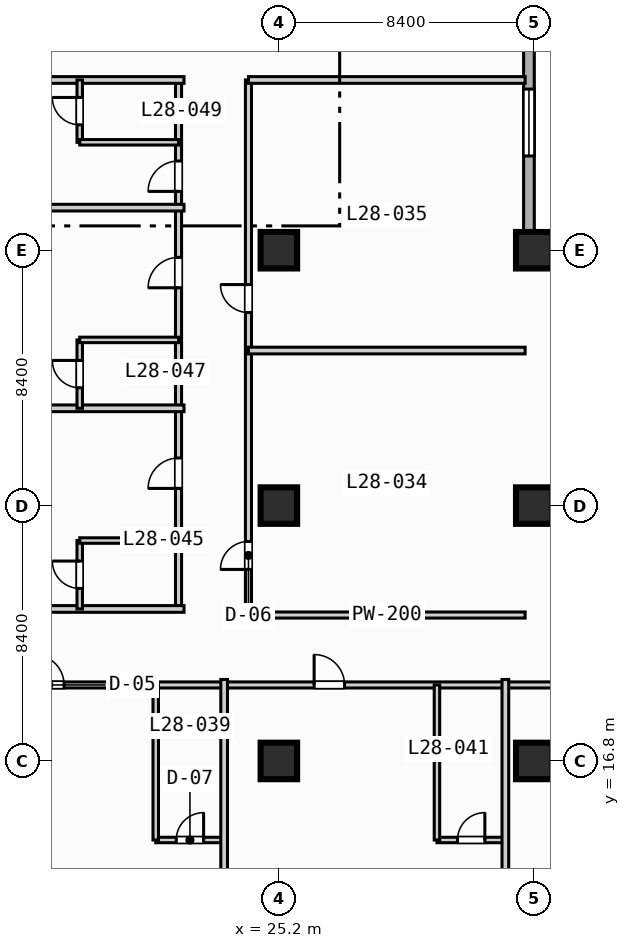
"""IFC4 building model, lengths in metres.
Left out: names, types, materials, properties, quantities, classifications, styles, units other than length and angle.
Written with IfcOpenShell. Run it as: python <this file> out.ifc"""

import sys

from ifc_helpers import new_model, si_unit, direction, frame, frame_2d, origin, origin_2d, place, context, subcontext, project, spatial, rectangle, extrude, element, fill, save


model = new_model("IFC4")
c1 = context("Model", 3, precision=1e-05, world=origin(), true_north=direction((0.0, 1.0)))
c2 = subcontext(c1, "Body", "Model", "MODEL_VIEW")
j1 = project(units=[si_unit("LENGTHUNIT", "METRE"), si_unit("PLANEANGLEUNIT", "RADIAN")], contexts=[c1])
p1 = place(None, origin())
s1 = spatial("IfcSite", under=j1, at=p1, CompositionType="ELEMENT")
p2 = place(p1, origin())
s2 = spatial("IfcBuilding", under=s1, at=p2, CompositionType="ELEMENT")
p3 = place(p2, frame((0.0, 0.0, 119.0)))
s3 = spatial("IfcBuildingStorey", under=s2, at=p3, CompositionType="ELEMENT", Elevation=119.0)
for number, where, z_axis, x_axis in (
    (1, (25.2, 16.8, 0.0), (0.0, 0.0, 1.0), (1.0, 0.0, 0.0)),
    (2, (25.2, 25.2, 0.0), (0.0, 0.0, 1.0), (1.0, 0.0, 0.0)),
    (3, (25.2, 33.6, 0.0), (0.0, 0.0, 1.0), (1.0, 0.0, 0.0)),
    (4, (33.6, 16.8, 0.0), (0.0, 0.0, 1.0), (1.0, 0.0, 0.0)),
    (5, (33.6, 25.2, 0.0), (0.0, 0.0, 1.0), (1.0, 0.0, 0.0)),
    (6, (33.6, 33.6, 0.0), (0.0, 0.0, 1.0), (1.0, 0.0, 0.0)),
):
    element("IfcColumn", number, at=place(p3, frame(where, z_axis=z_axis, x_axis=x_axis)), inside=s3, PredefinedType="COLUMN", context=c2, shape_type="SweptSolid", body=[
        extrude(rectangle(XDim=1.2, YDim=1.2, at=origin_2d()), origin(), (0.0, 0.0, 1.0), 3.8),
    ])
p4 = place(p3, frame((33.425, 89.225, 0.0), z_axis=(0.0, 0.0, 1.0), x_axis=(0.0, -1.0, 0.0)))
e7 = element("IfcWall", 7, at=p4, inside=s3, PredefinedType="STANDARD", context=c2, shape_type="SweptSolid", body=[
    extrude(rectangle(XDim=55.8, YDim=0.35, at=frame_2d((27.9, 0.0))), origin(), (0.0, 0.0, 1.0), 3.55),
])
p5 = place(p4, frame((50.325, 0.0, 0.85)))
e8 = element("IfcOpeningElement", 8, at=p5, cuts=e7, PredefinedType="OPENING", context=c2, shape_type="SweptSolid", body=[
    extrude(rectangle(XDim=2.2, YDim=1.8, at=frame_2d((1.1, 0.9))), frame((0.0, 0.185, 0.0), z_axis=(0.0, -1.0, 0.0), x_axis=(1.0, 0.0, 0.0)), (0.0, 0.0, 1.0), 0.37),
])
p6 = place(p4, frame((33.525, 0.0, 0.85)))
e9 = element("IfcOpeningElement", 9, at=p6, cuts=e7, PredefinedType="OPENING", context=c2, shape_type="SweptSolid", body=[
    extrude(rectangle(XDim=2.2, YDim=1.8, at=frame_2d((1.1, 0.9))), frame((0.0, 0.185, 0.0), z_axis=(0.0, -1.0, 0.0), x_axis=(1.0, 0.0, 0.0)), (0.0, 0.0, 1.0), 0.37),
])
p7 = place(p4, frame((25.125, 0.0, 0.85)))
e10 = element("IfcOpeningElement", 10, at=p7, cuts=e7, PredefinedType="OPENING", context=c2, shape_type="SweptSolid", body=[
    extrude(rectangle(XDim=2.2, YDim=1.8, at=frame_2d((1.1, 0.9))), frame((0.0, 0.185, 0.0), z_axis=(0.0, -1.0, 0.0), x_axis=(1.0, 0.0, 0.0)), (0.0, 0.0, 1.0), 0.37),
])
p8 = place(p4, frame((16.725, 0.0, 0.85)))
e11 = element("IfcOpeningElement", 11, at=p8, cuts=e7, PredefinedType="OPENING", context=c2, shape_type="SweptSolid", body=[
    extrude(rectangle(XDim=2.2, YDim=1.8, at=frame_2d((1.1, 0.9))), frame((0.0, 0.185, 0.0), z_axis=(0.0, -1.0, 0.0), x_axis=(1.0, 0.0, 0.0)), (0.0, 0.0, 1.0), 0.37),
])
p9 = place(p4, frame((8.325, 0.0, 0.85)))
e12 = element("IfcOpeningElement", 12, at=p9, cuts=e7, PredefinedType="OPENING", context=c2, shape_type="SweptSolid", body=[
    extrude(rectangle(XDim=2.2, YDim=1.8, at=frame_2d((1.1, 0.9))), frame((0.0, 0.185, 0.0), z_axis=(0.0, -1.0, 0.0), x_axis=(1.0, 0.0, 0.0)), (0.0, 0.0, 1.0), 0.37),
])
p10 = place(p3, frame((33.425, 33.425, 0.0), z_axis=(0.0, 0.0, 1.0), x_axis=(1.0, 0.0, 0.0)))
e13 = element("IfcWall", 13, at=p10, inside=s3, PredefinedType="STANDARD", context=c2, shape_type="SweptSolid", body=[
    extrude(rectangle(XDim=39.0, YDim=0.35, at=frame_2d((19.5, 0.0))), origin(), (0.0, 0.0, 1.0), 3.55),
])
p11 = place(p10, frame((12.075, 0.0, 0.0)))
e14 = element("IfcOpeningElement", 14, at=p11, cuts=e13, PredefinedType="OPENING", context=c2, shape_type="SweptSolid", body=[
    extrude(rectangle(XDim=1.4, YDim=2.2, at=frame_2d((0.7, 1.1))), frame((0.0, 0.185, 0.0), z_axis=(0.0, -1.0, 0.0), x_axis=(1.0, 0.0, 0.0)), (0.0, 0.0, 1.0), 0.37),
])
p12 = place(p10, frame((20.075, 0.0, 0.85)))
e15 = element("IfcOpeningElement", 15, at=p12, cuts=e13, PredefinedType="OPENING", context=c2, shape_type="SweptSolid", body=[
    extrude(rectangle(XDim=2.2, YDim=1.8, at=frame_2d((1.1, 0.9))), frame((0.0, 0.185, 0.0), z_axis=(0.0, -1.0, 0.0), x_axis=(1.0, 0.0, 0.0)), (0.0, 0.0, 1.0), 0.37),
])
p13 = place(p10, frame((28.475, 0.0, 0.85)))
e16 = element("IfcOpeningElement", 16, at=p13, cuts=e13, PredefinedType="OPENING", context=c2, shape_type="SweptSolid", body=[
    extrude(rectangle(XDim=2.2, YDim=1.8, at=frame_2d((1.1, 0.9))), frame((0.0, 0.185, 0.0), z_axis=(0.0, -1.0, 0.0), x_axis=(1.0, 0.0, 0.0)), (0.0, 0.0, 1.0), 0.37),
])
p14 = place(p3, frame((24.2, 21.6, 0.0), z_axis=(0.0, 0.0, 1.0), x_axis=(0.0, 1.0, 0.0)))
e17 = element("IfcWall", 17, at=p14, inside=s3, PredefinedType="PARTITIONING", context=c2, shape_type="SweptSolid", body=[
    extrude(rectangle(XDim=17.6, YDim=0.2, at=frame_2d((8.8, 0.0))), origin(), (0.0, 0.0, 1.0), 3.55),
])
p15 = place(p14, frame((1.5, 0.0, 0.0)))
e18 = element("IfcOpeningElement", 18, at=p15, cuts=e17, PredefinedType="OPENING", context=c2, shape_type="SweptSolid", body=[
    extrude(rectangle(XDim=0.92, YDim=2.1, at=frame_2d((0.46, 1.05))), frame((0.0, 0.11, 0.0), z_axis=(0.0, -1.0, 0.0), x_axis=(1.0, 0.0, 0.0)), (0.0, 0.0, 1.0), 0.22),
])
p16 = place(p14, frame((9.95, 0.0, 0.0)))
e19 = element("IfcOpeningElement", 19, at=p16, cuts=e17, PredefinedType="OPENING", context=c2, shape_type="SweptSolid", body=[
    extrude(rectangle(XDim=0.92, YDim=2.1, at=frame_2d((0.46, 1.05))), frame((0.0, 0.11, 0.0), z_axis=(0.0, -1.0, 0.0), x_axis=(1.0, 0.0, 0.0)), (0.0, 0.0, 1.0), 0.22),
])
p17 = place(p3, frame((24.2, 21.6, 0.0), z_axis=(0.0, 0.0, 1.0), x_axis=(1.0, 0.0, 0.0)))
e20 = element("IfcWall", 20, at=p17, inside=s3, PredefinedType="PARTITIONING", context=c2, shape_type="SweptSolid", body=[
    extrude(rectangle(XDim=9.1, YDim=0.2, at=frame_2d((4.55, 0.0))), origin(), (0.0, 0.0, 1.0), 3.55),
])
for number, where, z_axis, x_axis in (
    (21, (24.2, 30.3, 0.0), (0.0, 0.0, 1.0), (1.0, 0.0, 0.0)),
    (22, (24.2, 39.2, 0.0), (0.0, 0.0, 1.0), (1.0, 0.0, 0.0)),
):
    element("IfcWall", number, at=place(p3, frame(where, z_axis=z_axis, x_axis=x_axis)), inside=s3, PredefinedType="PARTITIONING", context=c2, shape_type="SweptSolid", body=[
        extrude(rectangle(XDim=9.1, YDim=0.22, at=frame_2d((4.55, 0.0))), origin(), (0.0, 0.0, 1.0), 3.55),
    ])
p18 = place(p3, frame((3.4, 19.3, 0.0), z_axis=(0.0, 0.0, 1.0), x_axis=(1.0, 0.0, 0.0)))
e23 = element("IfcWall", 23, at=p18, inside=s3, PredefinedType="PARTITIONING", context=c2, shape_type="SweptSolid", body=[
    extrude(rectangle(XDim=35.8, YDim=0.2, at=frame_2d((17.9, 0.0))), origin(), (0.0, 0.0, 1.0), 3.55),
])
p19 = place(p18, frame((6.065, 0.0, 0.0)))
e24 = element("IfcOpeningElement", 24, at=p19, cuts=e23, PredefinedType="OPENING", context=c2, shape_type="SweptSolid", body=[
    extrude(rectangle(XDim=1.0, YDim=2.15, at=frame_2d((0.5, 1.075))), frame((0.0, 0.11, 0.0), z_axis=(0.0, -1.0, 0.0), x_axis=(1.0, 0.0, 0.0)), (0.0, 0.0, 1.0), 0.22),
])
p20 = place(p18, frame((13.735, 0.0, 0.0)))
e25 = element("IfcOpeningElement", 25, at=p20, cuts=e23, PredefinedType="OPENING", context=c2, shape_type="SweptSolid", body=[
    extrude(rectangle(XDim=1.0, YDim=2.15, at=frame_2d((0.5, 1.075))), frame((0.0, 0.11, 0.0), z_axis=(0.0, -1.0, 0.0), x_axis=(1.0, 0.0, 0.0)), (0.0, 0.0, 1.0), 0.22),
])
p21 = place(p18, frame((22.96, 0.0, 0.0)))
e26 = element("IfcOpeningElement", 26, at=p21, cuts=e23, PredefinedType="OPENING", context=c2, shape_type="SweptSolid", body=[
    extrude(rectangle(XDim=1.0, YDim=2.15, at=frame_2d((0.5, 1.075))), frame((0.0, 0.11, 0.0), z_axis=(0.0, -1.0, 0.0), x_axis=(1.0, 0.0, 0.0)), (0.0, 0.0, 1.0), 0.22),
])
p22 = place(p18, frame((30.86, 0.0, 0.0)))
e27 = element("IfcOpeningElement", 27, at=p22, cuts=e23, PredefinedType="OPENING", context=c2, shape_type="SweptSolid", body=[
    extrude(rectangle(XDim=1.0, YDim=2.15, at=frame_2d((0.5, 1.075))), frame((0.0, 0.11, 0.0), z_axis=(0.0, -1.0, 0.0), x_axis=(1.0, 0.0, 0.0)), (0.0, 0.0, 1.0), 0.22),
])
p23 = place(p3, frame((21.15, 14.2, 0.0), z_axis=(0.0, 0.0, 1.0), x_axis=(1.0, 0.0, 0.0)))
e28 = element("IfcWall", 28, at=p23, inside=s3, PredefinedType="PLUMBINGWALL", context=c2, shape_type="SweptSolid", body=[
    extrude(rectangle(XDim=2.25, YDim=0.18, at=frame_2d((1.125, 0.0))), origin(), (0.0, 0.0, 1.0), 3.55),
])
p24 = place(p23, frame((0.675, 0.0, 0.0)))
e29 = element("IfcOpeningElement", 29, at=p24, cuts=e28, PredefinedType="OPENING", context=c2, shape_type="SweptSolid", body=[
    extrude(rectangle(XDim=0.9, YDim=2.1, at=frame_2d((0.45, 1.05))), frame((0.0, 0.1, 0.0), z_axis=(0.0, -1.0, 0.0), x_axis=(1.0, 0.0, 0.0)), (0.0, 0.0, 1.0), 0.2),
])
p25 = place(p3, frame((21.15, 14.2, 0.0), z_axis=(0.0, 0.0, 1.0), x_axis=(0.0, 1.0, 0.0)))
e30 = element("IfcWall", 30, at=p25, inside=s3, PredefinedType="PLUMBINGWALL", context=c2, shape_type="SweptSolid", body=[
    extrude(rectangle(XDim=5.1, YDim=0.18, at=frame_2d((2.55, 0.0))), origin(), (0.0, 0.0, 1.0), 3.55),
])
p26 = place(p3, frame((23.4, 0.2, 0.0), z_axis=(0.0, 0.0, 1.0), x_axis=(0.0, 1.0, 0.0)))
e31 = element("IfcWall", 31, at=p26, inside=s3, PredefinedType="PARTITIONING", context=c2, shape_type="SweptSolid", body=[
    extrude(rectangle(XDim=19.28, YDim=0.22, at=frame_2d((9.64, 0.0))), origin(), (0.0, 0.0, 1.0), 3.55),
])
p27 = place(p3, frame((30.4, 14.2, 0.0), z_axis=(0.0, 0.0, 1.0), x_axis=(1.0, 0.0, 0.0)))
e32 = element("IfcWall", 32, at=p27, inside=s3, PredefinedType="PLUMBINGWALL", context=c2, shape_type="SweptSolid", body=[
    extrude(rectangle(XDim=2.25, YDim=0.18, at=frame_2d((1.125, 0.0))), origin(), (0.0, 0.0, 1.0), 3.55),
])
p28 = place(p27, frame((0.675, 0.0, 0.0)))
e33 = element("IfcOpeningElement", 33, at=p28, cuts=e32, PredefinedType="OPENING", context=c2, shape_type="SweptSolid", body=[
    extrude(rectangle(XDim=0.9, YDim=2.1, at=frame_2d((0.45, 1.05))), frame((0.0, 0.1, 0.0), z_axis=(0.0, -1.0, 0.0), x_axis=(1.0, 0.0, 0.0)), (0.0, 0.0, 1.0), 0.2),
])
p29 = place(p3, frame((30.4, 14.2, 0.0), z_axis=(0.0, 0.0, 1.0), x_axis=(0.0, 1.0, 0.0)))
e34 = element("IfcWall", 34, at=p29, inside=s3, PredefinedType="PLUMBINGWALL", context=c2, shape_type="SweptSolid", body=[
    extrude(rectangle(XDim=5.1, YDim=0.18, at=frame_2d((2.55, 0.0))), origin(), (0.0, 0.0, 1.0), 3.55),
])
p30 = place(p3, frame((32.65, 0.2, 0.0), z_axis=(0.0, 0.0, 1.0), x_axis=(0.0, 1.0, 0.0)))
e35 = element("IfcWall", 35, at=p30, inside=s3, PredefinedType="PARTITIONING", context=c2, shape_type="SweptSolid", body=[
    extrude(rectangle(XDim=19.28, YDim=0.22, at=frame_2d((9.64, 0.0))), origin(), (0.0, 0.0, 1.0), 3.55),
])
p31 = place(p3, frame((21.9, 21.8, 0.0), z_axis=(0.0, 0.0, 1.0), x_axis=(0.0, 1.0, 0.0)))
e36 = element("IfcWall", 36, at=p31, inside=s3, PredefinedType="PARTITIONING", context=c2, shape_type="SweptSolid", body=[
    extrude(rectangle(XDim=17.4, YDim=0.2, at=frame_2d((8.7, 0.0))), origin(), (0.0, 0.0, 1.0), 3.55),
])
p32 = place(p31, frame((3.965, 0.0, 0.0)))
e37 = element("IfcOpeningElement", 37, at=p32, cuts=e36, PredefinedType="OPENING", context=c2, shape_type="SweptSolid", body=[
    extrude(rectangle(XDim=1.0, YDim=2.15, at=frame_2d((0.5, 1.075))), frame((0.0, 0.11, 0.0), z_axis=(0.0, -1.0, 0.0), x_axis=(1.0, 0.0, 0.0)), (0.0, 0.0, 1.0), 0.22),
])
p33 = place(p31, frame((10.565, 0.0, 0.0)))
e38 = element("IfcOpeningElement", 38, at=p33, cuts=e36, PredefinedType="OPENING", context=c2, shape_type="SweptSolid", body=[
    extrude(rectangle(XDim=1.0, YDim=2.15, at=frame_2d((0.5, 1.075))), frame((0.0, 0.11, 0.0), z_axis=(0.0, -1.0, 0.0), x_axis=(1.0, 0.0, 0.0)), (0.0, 0.0, 1.0), 0.22),
])
p34 = place(p31, frame((13.735, 0.0, 0.0)))
e39 = element("IfcOpeningElement", 39, at=p34, cuts=e36, PredefinedType="OPENING", context=c2, shape_type="SweptSolid", body=[
    extrude(rectangle(XDim=1.0, YDim=2.15, at=frame_2d((0.5, 1.075))), frame((0.0, 0.11, 0.0), z_axis=(0.0, -1.0, 0.0), x_axis=(1.0, 0.0, 0.0)), (0.0, 0.0, 1.0), 0.22),
])
p35 = place(p3, frame((0.2, 21.8, 0.0), z_axis=(0.0, 0.0, 1.0), x_axis=(1.0, 0.0, 0.0)))
e40 = element("IfcWall", 40, at=p35, inside=s3, PredefinedType="PARTITIONING", context=c2, shape_type="SweptSolid", body=[
    extrude(rectangle(XDim=21.88, YDim=0.22, at=frame_2d((10.94, 0.0))), origin(), (0.0, 0.0, 1.0), 3.55),
])
p36 = place(p3, frame((18.65, 21.8, 0.0), z_axis=(0.0, 0.0, 1.0), x_axis=(0.0, 1.0, 0.0)))
e41 = element("IfcWall", 41, at=p36, inside=s3, PredefinedType="PLUMBINGWALL", context=c2, shape_type="SweptSolid", body=[
    extrude(rectangle(XDim=2.25, YDim=0.18, at=frame_2d((1.125, 0.0))), origin(), (0.0, 0.0, 1.0), 3.55),
])
p37 = place(p36, frame((0.675, 0.0, 0.0)))
e42 = element("IfcOpeningElement", 42, at=p37, cuts=e41, PredefinedType="OPENING", context=c2, shape_type="SweptSolid", body=[
    extrude(rectangle(XDim=0.9, YDim=2.1, at=frame_2d((0.45, 1.05))), frame((0.0, 0.1, 0.0), z_axis=(0.0, -1.0, 0.0), x_axis=(1.0, 0.0, 0.0)), (0.0, 0.0, 1.0), 0.2),
])
p38 = place(p3, frame((18.65, 24.05, 0.0), z_axis=(0.0, 0.0, 1.0), x_axis=(1.0, 0.0, 0.0)))
e43 = element("IfcWall", 43, at=p38, inside=s3, PredefinedType="PLUMBINGWALL", context=c2, shape_type="SweptSolid", body=[
    extrude(rectangle(XDim=3.25, YDim=0.18, at=frame_2d((1.625, 0.0))), origin(), (0.0, 0.0, 1.0), 3.55),
])
p39 = place(p3, frame((0.2, 28.4, 0.0), z_axis=(0.0, 0.0, 1.0), x_axis=(1.0, 0.0, 0.0)))
e44 = element("IfcWall", 44, at=p39, inside=s3, PredefinedType="PARTITIONING", context=c2, shape_type="SweptSolid", body=[
    extrude(rectangle(XDim=21.88, YDim=0.22, at=frame_2d((10.94, 0.0))), origin(), (0.0, 0.0, 1.0), 3.55),
])
p40 = place(p3, frame((18.65, 28.4, 0.0), z_axis=(0.0, 0.0, 1.0), x_axis=(0.0, 1.0, 0.0)))
e45 = element("IfcWall", 45, at=p40, inside=s3, PredefinedType="PLUMBINGWALL", context=c2, shape_type="SweptSolid", body=[
    extrude(rectangle(XDim=2.25, YDim=0.18, at=frame_2d((1.125, 0.0))), origin(), (0.0, 0.0, 1.0), 3.55),
])
p41 = place(p40, frame((0.675, 0.0, 0.0)))
e46 = element("IfcOpeningElement", 46, at=p41, cuts=e45, PredefinedType="OPENING", context=c2, shape_type="SweptSolid", body=[
    extrude(rectangle(XDim=0.9, YDim=2.1, at=frame_2d((0.45, 1.05))), frame((0.0, 0.1, 0.0), z_axis=(0.0, -1.0, 0.0), x_axis=(1.0, 0.0, 0.0)), (0.0, 0.0, 1.0), 0.2),
])
p42 = place(p3, frame((18.65, 30.65, 0.0), z_axis=(0.0, 0.0, 1.0), x_axis=(1.0, 0.0, 0.0)))
e47 = element("IfcWall", 47, at=p42, inside=s3, PredefinedType="PLUMBINGWALL", context=c2, shape_type="SweptSolid", body=[
    extrude(rectangle(XDim=3.25, YDim=0.18, at=frame_2d((1.625, 0.0))), origin(), (0.0, 0.0, 1.0), 3.55),
])
for number, where, z_axis, x_axis in (
    (48, (0.2, 35.0, 0.0), (0.0, 0.0, 1.0), (1.0, 0.0, 0.0)),
    (49, (0.2, 39.2, 0.0), (0.0, 0.0, 1.0), (1.0, 0.0, 0.0)),
):
    element("IfcWall", number, at=place(p3, frame(where, z_axis=z_axis, x_axis=x_axis)), inside=s3, PredefinedType="PARTITIONING", context=c2, shape_type="SweptSolid", body=[
        extrude(rectangle(XDim=21.88, YDim=0.22, at=frame_2d((10.94, 0.0))), origin(), (0.0, 0.0, 1.0), 3.55),
    ])
p43 = place(p3, frame((18.65, 37.15, 0.0), z_axis=(0.0, 0.0, 1.0), x_axis=(0.0, 1.0, 0.0)))
e50 = element("IfcWall", 50, at=p43, inside=s3, PredefinedType="PLUMBINGWALL", context=c2, shape_type="SweptSolid", body=[
    extrude(rectangle(XDim=2.05, YDim=0.18, at=frame_2d((1.025, 0.0))), origin(), (0.0, 0.0, 1.0), 3.55),
])
p44 = place(p43, frame((0.575, 0.0, 0.0)))
e51 = element("IfcOpeningElement", 51, at=p44, cuts=e50, PredefinedType="OPENING", context=c2, shape_type="SweptSolid", body=[
    extrude(rectangle(XDim=0.9, YDim=2.1, at=frame_2d((0.45, 1.05))), frame((0.0, 0.1, 0.0), z_axis=(0.0, -1.0, 0.0), x_axis=(1.0, 0.0, 0.0)), (0.0, 0.0, 1.0), 0.2),
])
p45 = place(p3, frame((18.65, 37.15, 0.0), z_axis=(0.0, 0.0, 1.0), x_axis=(1.0, 0.0, 0.0)))
e52 = element("IfcWall", 52, at=p45, inside=s3, PredefinedType="PLUMBINGWALL", context=c2, shape_type="SweptSolid", body=[
    extrude(rectangle(XDim=3.25, YDim=0.18, at=frame_2d((1.625, 0.0))), origin(), (0.0, 0.0, 1.0), 3.55),
])
p46 = place(p5, origin())
e53 = element("IfcWindow", 53, at=p46, inside=s3, PartitioningType="SINGLE_PANEL", PredefinedType="WINDOW", context=c2, shape_type="SweptSolid", body=[
    extrude(rectangle(XDim=2.2, YDim=1.8, at=frame_2d((1.1, 0.9))), frame((0.0, 0.03, 0.0), z_axis=(0.0, -1.0, 0.0), x_axis=(1.0, 0.0, 0.0)), (0.0, 0.0, 1.0), 0.06),
])
fill(e8, e53)
p47 = place(p15, origin())
e54 = element("IfcDoor", 54, at=p47, inside=s3, OperationType="SINGLE_SWING_LEFT", PredefinedType="DOOR", context=c2, shape_type="SweptSolid", body=[
    extrude(rectangle(XDim=0.92, YDim=2.1, at=frame_2d((0.46, 1.05))), frame((0.0, 0.025, 0.0), z_axis=(0.0, -1.0, 0.0), x_axis=(1.0, 0.0, 0.0)), (0.0, 0.0, 1.0), 0.05),
])
fill(e18, e54)
p48 = place(p16, origin())
e55 = element("IfcDoor", 55, at=p48, inside=s3, OperationType="SINGLE_SWING_RIGHT", PredefinedType="DOOR", context=c2, shape_type="SweptSolid", body=[
    extrude(rectangle(XDim=0.92, YDim=2.1, at=frame_2d((0.46, 1.05))), frame((0.0, 0.025, 0.0), z_axis=(0.0, -1.0, 0.0), x_axis=(1.0, 0.0, 0.0)), (0.0, 0.0, 1.0), 0.05),
])
fill(e19, e55)
p49 = place(p20, origin())
e56 = element("IfcDoor", 56, at=p49, inside=s3, OperationType="SINGLE_SWING_LEFT", PredefinedType="DOOR", context=c2, shape_type="SweptSolid", body=[
    extrude(rectangle(XDim=1.0, YDim=2.15, at=frame_2d((0.5, 1.075))), frame((0.0, 0.025, 0.0), z_axis=(0.0, -1.0, 0.0), x_axis=(1.0, 0.0, 0.0)), (0.0, 0.0, 1.0), 0.05),
])
fill(e25, e56)
p50 = place(p21, origin())
e57 = element("IfcDoor", 57, at=p50, inside=s3, OperationType="SINGLE_SWING_LEFT", PredefinedType="DOOR", context=c2, shape_type="SweptSolid", body=[
    extrude(rectangle(XDim=1.0, YDim=2.15, at=frame_2d((0.5, 1.075))), frame((0.0, 0.025, 0.0), z_axis=(0.0, -1.0, 0.0), x_axis=(1.0, 0.0, 0.0)), (0.0, 0.0, 1.0), 0.05),
])
fill(e26, e57)
p51 = place(p24, origin())
e58 = element("IfcDoor", 58, at=p51, inside=s3, OperationType="SINGLE_SWING_RIGHT", PredefinedType="DOOR", context=c2, shape_type="SweptSolid", body=[
    extrude(rectangle(XDim=0.9, YDim=2.1, at=frame_2d((0.45, 1.05))), frame((0.0, 0.025, 0.0), z_axis=(0.0, -1.0, 0.0), x_axis=(1.0, 0.0, 0.0)), (0.0, 0.0, 1.0), 0.05),
])
fill(e29, e58)
p52 = place(p28, origin())
e59 = element("IfcDoor", 59, at=p52, inside=s3, OperationType="SINGLE_SWING_RIGHT", PredefinedType="DOOR", context=c2, shape_type="SweptSolid", body=[
    extrude(rectangle(XDim=0.9, YDim=2.1, at=frame_2d((0.45, 1.05))), frame((0.0, 0.025, 0.0), z_axis=(0.0, -1.0, 0.0), x_axis=(1.0, 0.0, 0.0)), (0.0, 0.0, 1.0), 0.05),
])
fill(e33, e59)
p53 = place(p32, origin())
e60 = element("IfcDoor", 60, at=p53, inside=s3, OperationType="SINGLE_SWING_LEFT", PredefinedType="DOOR", context=c2, shape_type="SweptSolid", body=[
    extrude(rectangle(XDim=1.0, YDim=2.15, at=frame_2d((0.5, 1.075))), frame((0.0, 0.025, 0.0), z_axis=(0.0, -1.0, 0.0), x_axis=(1.0, 0.0, 0.0)), (0.0, 0.0, 1.0), 0.05),
])
fill(e37, e60)
p54 = place(p33, origin())
e61 = element("IfcDoor", 61, at=p54, inside=s3, OperationType="SINGLE_SWING_LEFT", PredefinedType="DOOR", context=c2, shape_type="SweptSolid", body=[
    extrude(rectangle(XDim=1.0, YDim=2.15, at=frame_2d((0.5, 1.075))), frame((0.0, 0.025, 0.0), z_axis=(0.0, -1.0, 0.0), x_axis=(1.0, 0.0, 0.0)), (0.0, 0.0, 1.0), 0.05),
])
fill(e38, e61)
p55 = place(p34, origin())
e62 = element("IfcDoor", 62, at=p55, inside=s3, OperationType="SINGLE_SWING_LEFT", PredefinedType="DOOR", context=c2, shape_type="SweptSolid", body=[
    extrude(rectangle(XDim=1.0, YDim=2.15, at=frame_2d((0.5, 1.075))), frame((0.0, 0.025, 0.0), z_axis=(0.0, -1.0, 0.0), x_axis=(1.0, 0.0, 0.0)), (0.0, 0.0, 1.0), 0.05),
])
fill(e39, e62)
p56 = place(p37, origin())
e63 = element("IfcDoor", 63, at=p56, inside=s3, OperationType="SINGLE_SWING_RIGHT", PredefinedType="DOOR", context=c2, shape_type="SweptSolid", body=[
    extrude(rectangle(XDim=0.9, YDim=2.1, at=frame_2d((0.45, 1.05))), frame((0.0, 0.025, 0.0), z_axis=(0.0, -1.0, 0.0), x_axis=(1.0, 0.0, 0.0)), (0.0, 0.0, 1.0), 0.05),
])
fill(e42, e63)
p57 = place(p41, origin())
e64 = element("IfcDoor", 64, at=p57, inside=s3, OperationType="SINGLE_SWING_RIGHT", PredefinedType="DOOR", context=c2, shape_type="SweptSolid", body=[
    extrude(rectangle(XDim=0.9, YDim=2.1, at=frame_2d((0.45, 1.05))), frame((0.0, 0.025, 0.0), z_axis=(0.0, -1.0, 0.0), x_axis=(1.0, 0.0, 0.0)), (0.0, 0.0, 1.0), 0.05),
])
fill(e46, e64)
p58 = place(p44, origin())
e65 = element("IfcDoor", 65, at=p58, inside=s3, OperationType="SINGLE_SWING_RIGHT", PredefinedType="DOOR", context=c2, shape_type="SweptSolid", body=[
    extrude(rectangle(XDim=0.9, YDim=2.1, at=frame_2d((0.45, 1.05))), frame((0.0, 0.025, 0.0), z_axis=(0.0, -1.0, 0.0), x_axis=(1.0, 0.0, 0.0)), (0.0, 0.0, 1.0), 0.05),
])
fill(e51, e65)
save(model, sys.argv[1])
